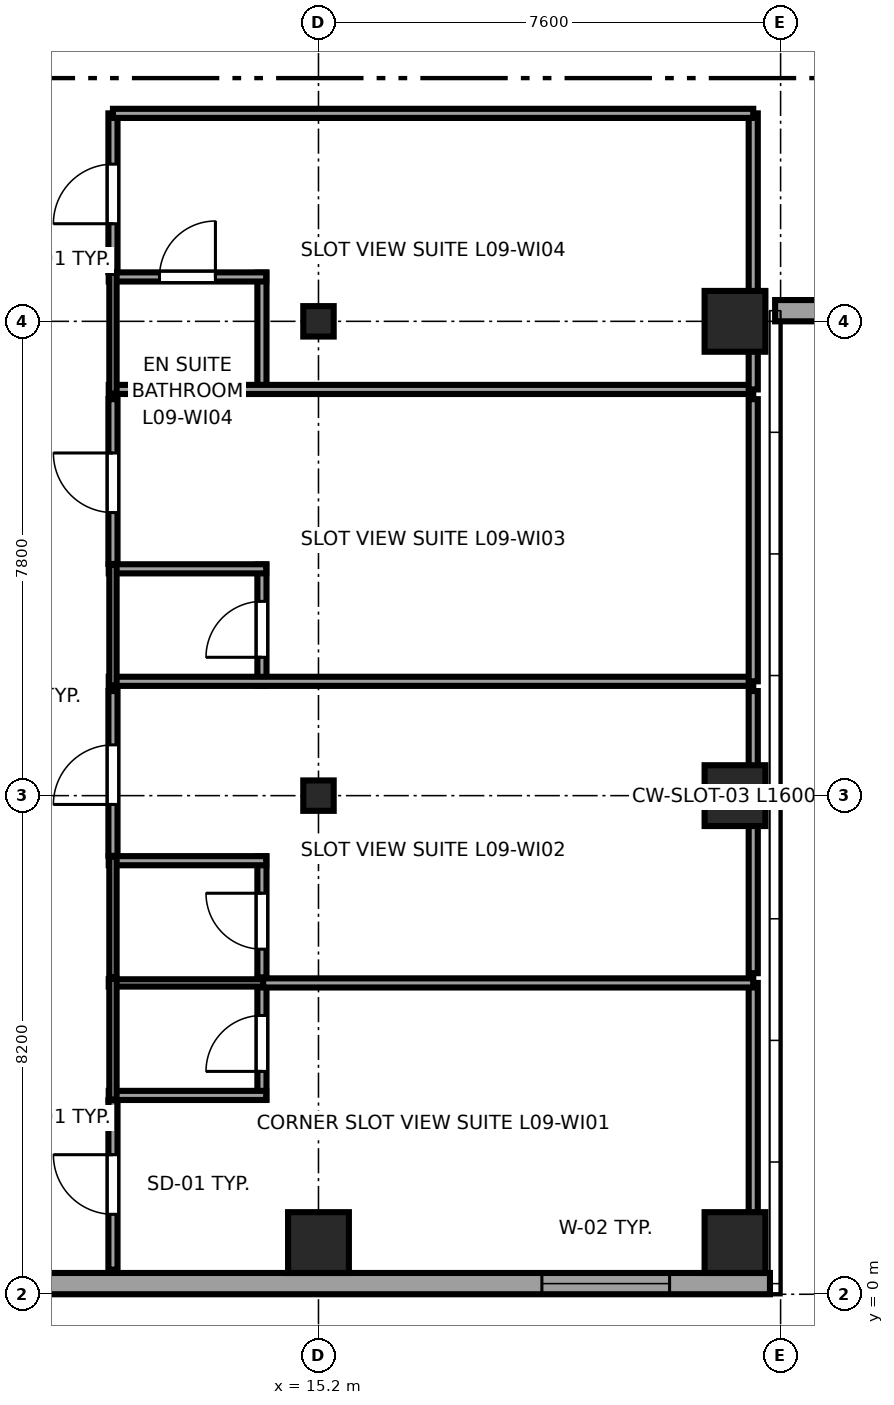
"""IFC4 building model, lengths in metres.
Left out: names, types, materials, properties, quantities, classifications, styles, units other than length and angle.
Written with IfcOpenShell. Run it as: python <this file> out.ifc"""

import sys

from ifc_helpers import new_model, si_unit, direction, frame, frame_2d, origin, origin_2d, place, context, subcontext, project, spatial, rectangle, i_section, extrude, source, transform, mapped, element, fill, save


model = new_model("IFC4")
c1 = context("Model", 3, precision=1e-05, world=origin(), true_north=direction((0.0, 1.0)))
c2 = subcontext(c1, "Body", "Model", "MODEL_VIEW")
j1 = project(units=[si_unit("LENGTHUNIT", "METRE"), si_unit("PLANEANGLEUNIT", "RADIAN")], contexts=[c1])
p1 = place(None, origin())
s1 = spatial("IfcSite", under=j1, at=p1, CompositionType="ELEMENT")
p2 = place(p1, origin())
s2 = spatial("IfcBuilding", under=s1, at=p2, CompositionType="ELEMENT")
p3 = place(p2, frame((0.0, 0.0, 42.65)))
s3 = spatial("IfcBuildingStorey", under=s2, at=p3, CompositionType="ELEMENT", Elevation=42.65)
m1 = source(origin(), c2, "Body", "SweptSolid", [
    extrude(rectangle(XDim=1.0, YDim=1.0, at=origin_2d()), origin(), (0.0, 0.0, 1.0), 3.55),
])
p4 = place(p3, frame((15.2, 0.85, 0.0), z_axis=(0.0, 0.0, 1.0), x_axis=(1.0, 0.0, 0.0)))
e1 = element("IfcColumn", 1, at=p4, inside=s3, PredefinedType="COLUMN", context=c2, shape_type="MappedRepresentation", body=[
    mapped(m1, transform((0.0, 0.0, 0.0), x_axis=(1.0, 0.0, 0.0), y_axis=(0.0, 1.0, 0.0), z_axis=(0.0, 0.0, 1.0), scale=1.0)),
])
m2 = source(origin(), c2, "Body", "SweptSolid", [
    extrude(i_section(OverallWidth=0.5, OverallDepth=0.5, WebThickness=0.028, FlangeThickness=0.045, at=origin_2d()), origin(), (0.0, 0.0, 1.0), 3.55),
])
for number, where, z_axis, x_axis in (
    (2, (15.2, 8.2, 0.0), (0.0, 0.0, 1.0), (1.0, 0.0, 0.0)),
    (3, (15.2, 16.0, 0.0), (0.0, 0.0, 1.0), (1.0, 0.0, 0.0)),
):
    element("IfcColumn", number, at=place(p3, frame(where, z_axis=z_axis, x_axis=x_axis)), inside=s3, PredefinedType="COLUMN", context=c2, shape_type="MappedRepresentation", body=[
        mapped(m2, transform((0.0, 0.0, 0.0), x_axis=(1.0, 0.0, 0.0), y_axis=(0.0, 1.0, 0.0), z_axis=(0.0, 0.0, 1.0), scale=1.0)),
    ])
for number, where, z_axis, x_axis in (
    (4, (22.05, 0.85, 0.0), (0.0, 0.0, 1.0), (1.0, 0.0, 0.0)),
    (5, (22.05, 8.2, 0.0), (0.0, 0.0, 1.0), (1.0, 0.0, 0.0)),
    (6, (22.05, 16.0, 0.0), (0.0, 0.0, 1.0), (1.0, 0.0, 0.0)),
):
    element("IfcColumn", number, at=place(p3, frame(where, z_axis=z_axis, x_axis=x_axis)), inside=s3, PredefinedType="COLUMN", context=c2, shape_type="MappedRepresentation", body=[
        mapped(m1, transform((0.0, 0.0, 0.0), x_axis=(1.0, 0.0, 0.0), y_axis=(0.0, 1.0, 0.0), z_axis=(0.0, 0.0, 1.0), scale=1.0)),
    ])
p5 = place(p3, frame((4.617, 0.175, 0.0), z_axis=(0.0, 0.0, 1.0), x_axis=(1.0, 0.0, 0.0)))
e7 = element("IfcWall", 7, at=p5, inside=s3, PredefinedType="SOLIDWALL", context=c2, shape_type="SweptSolid", body=[
    extrude(rectangle(XDim=18.008, YDim=0.35, at=frame_2d((9.004, 0.0))), origin(), (0.0, 0.0, 1.0), 3.37),
])
p6 = place(p5, frame((14.257, 0.0, 0.68)))
e8 = element("IfcOpeningElement", 8, at=p6, cuts=e7, PredefinedType="OPENING", context=c2, shape_type="SweptSolid", body=[
    extrude(rectangle(XDim=2.1, YDim=1.9, at=frame_2d((1.05, 0.95))), frame((0.0, 0.185, 0.0), z_axis=(0.0, -1.0, 0.0), x_axis=(1.0, 0.0, 0.0)), (0.0, 0.0, 1.0), 0.37),
])
p7 = place(p3, frame((22.71, 16.175, 0.0), z_axis=(0.0, 0.0, 1.0), x_axis=(1.0, 0.0, 0.0)))
e9 = element("IfcWall", 9, at=p7, inside=s3, PredefinedType="SOLIDWALL", context=c2, shape_type="SweptSolid", body=[
    extrude(rectangle(XDim=11.58, YDim=0.35, at=frame_2d((5.79, 0.0))), origin(), (0.0, 0.0, 1.0), 2.748),
])
p8 = place(p7, frame((2.145, 0.0, 0.68)))
e10 = element("IfcOpeningElement", 10, at=p8, cuts=e9, PredefinedType="OPENING", context=c2, shape_type="SweptSolid", body=[
    extrude(rectangle(XDim=2.1, YDim=1.9, at=frame_2d((1.05, 0.95))), frame((0.0, 0.185, 0.0), z_axis=(0.0, -1.0, 0.0), x_axis=(1.0, 0.0, 0.0)), (0.0, 0.0, 1.0), 0.37),
])
p9 = place(p7, frame((7.335, 0.0, 0.68)))
e11 = element("IfcOpeningElement", 11, at=p9, cuts=e9, PredefinedType="OPENING", context=c2, shape_type="SweptSolid", body=[
    extrude(rectangle(XDim=2.1, YDim=1.9, at=frame_2d((1.05, 0.95))), frame((0.0, 0.185, 0.0), z_axis=(0.0, -1.0, 0.0), x_axis=(1.0, 0.0, 0.0)), (0.0, 0.0, 1.0), 0.37),
])
p10 = place(p3, frame((14.27, 3.2, 0.0), z_axis=(0.0, 0.0, 1.0), x_axis=(0.0, 1.0, 0.0)))
e12 = element("IfcWall", 12, at=p10, inside=s3, PredefinedType="PARTITIONING", context=c2, shape_type="SweptSolid", body=[
    extrude(rectangle(XDim=1.99, YDim=0.15, at=frame_2d((0.995, 0.0))), origin(), (0.0, 0.0, 1.0), 3.37),
])
p11 = place(p10, frame((0.465, 0.0, 0.0)))
e13 = element("IfcOpeningElement", 13, at=p11, cuts=e12, PredefinedType="OPENING", context=c2, shape_type="SweptSolid", body=[
    extrude(rectangle(XDim=0.92, YDim=2.01, at=frame_2d((0.46, 1.005))), frame((0.0, 0.085, 0.0), z_axis=(0.0, -1.0, 0.0), x_axis=(1.0, 0.0, 0.0)), (0.0, 0.0, 1.0), 0.17),
])
p12 = place(p3, frame((11.75, 3.27, 0.0), z_axis=(0.0, 0.0, 1.0), x_axis=(1.0, 0.0, 0.0)))
e14 = element("IfcWall", 14, at=p12, inside=s3, PredefinedType="PARTITIONING", context=c2, shape_type="SweptSolid", body=[
    extrude(rectangle(XDim=2.59, YDim=0.15, at=frame_2d((1.295, 0.0))), origin(), (0.0, 0.0, 1.0), 3.37),
])
p13 = place(p3, frame((11.75, 5.12, 0.0), z_axis=(0.0, 0.0, 1.0), x_axis=(1.0, 0.0, 0.0)))
e15 = element("IfcWall", 15, at=p13, inside=s3, PredefinedType="PLUMBINGWALL", context=c2, shape_type="SweptSolid", body=[
    extrude(rectangle(XDim=2.59, YDim=0.12, at=frame_2d((1.295, 0.0))), origin(), (0.0, 0.0, 1.0), 3.37),
])
p14 = place(p3, frame((11.82, 3.2, 0.0), z_axis=(0.0, 0.0, 1.0), x_axis=(0.0, 1.0, 0.0)))
e16 = element("IfcWall", 16, at=p14, inside=s3, PredefinedType="PLUMBINGWALL", context=c2, shape_type="SweptSolid", body=[
    extrude(rectangle(XDim=1.99, YDim=0.12, at=frame_2d((0.995, 0.0))), origin(), (0.0, 0.0, 1.0), 3.37),
])
p15 = place(p3, frame((14.27, 5.21, 0.0), z_axis=(0.0, 0.0, 1.0), x_axis=(0.0, 1.0, 0.0)))
e17 = element("IfcWall", 17, at=p15, inside=s3, PredefinedType="PARTITIONING", context=c2, shape_type="SweptSolid", body=[
    extrude(rectangle(XDim=1.99, YDim=0.15, at=frame_2d((0.995, 0.0))), origin(), (0.0, 0.0, 1.0), 3.37),
])
p16 = place(p15, frame((0.465, 0.0, 0.0)))
e18 = element("IfcOpeningElement", 18, at=p16, cuts=e17, PredefinedType="OPENING", context=c2, shape_type="SweptSolid", body=[
    extrude(rectangle(XDim=0.92, YDim=2.01, at=frame_2d((0.46, 1.005))), frame((0.0, 0.085, 0.0), z_axis=(0.0, -1.0, 0.0), x_axis=(1.0, 0.0, 0.0)), (0.0, 0.0, 1.0), 0.17),
])
p17 = place(p3, frame((11.75, 7.13, 0.0), z_axis=(0.0, 0.0, 1.0), x_axis=(1.0, 0.0, 0.0)))
e19 = element("IfcWall", 19, at=p17, inside=s3, PredefinedType="PARTITIONING", context=c2, shape_type="SweptSolid", body=[
    extrude(rectangle(XDim=2.59, YDim=0.15, at=frame_2d((1.295, 0.0))), origin(), (0.0, 0.0, 1.0), 3.37),
])
p18 = place(p3, frame((11.82, 5.21, 0.0), z_axis=(0.0, 0.0, 1.0), x_axis=(0.0, 1.0, 0.0)))
e20 = element("IfcWall", 20, at=p18, inside=s3, PredefinedType="PLUMBINGWALL", context=c2, shape_type="SweptSolid", body=[
    extrude(rectangle(XDim=1.99, YDim=0.12, at=frame_2d((0.995, 0.0))), origin(), (0.0, 0.0, 1.0), 3.37),
])
p19 = place(p3, frame((14.27, 10.01, 0.0), z_axis=(0.0, 0.0, 1.0), x_axis=(0.0, 1.0, 0.0)))
e21 = element("IfcWall", 21, at=p19, inside=s3, PredefinedType="PARTITIONING", context=c2, shape_type="SweptSolid", body=[
    extrude(rectangle(XDim=1.99, YDim=0.15, at=frame_2d((0.995, 0.0))), origin(), (0.0, 0.0, 1.0), 3.37),
])
p20 = place(p19, frame((0.465, 0.0, 0.0)))
e22 = element("IfcOpeningElement", 22, at=p20, cuts=e21, PredefinedType="OPENING", context=c2, shape_type="SweptSolid", body=[
    extrude(rectangle(XDim=0.92, YDim=2.01, at=frame_2d((0.46, 1.005))), frame((0.0, 0.085, 0.0), z_axis=(0.0, -1.0, 0.0), x_axis=(1.0, 0.0, 0.0)), (0.0, 0.0, 1.0), 0.17),
])
p21 = place(p3, frame((11.75, 10.08, 0.0), z_axis=(0.0, 0.0, 1.0), x_axis=(1.0, 0.0, 0.0)))
e23 = element("IfcWall", 23, at=p21, inside=s3, PredefinedType="PARTITIONING", context=c2, shape_type="SweptSolid", body=[
    extrude(rectangle(XDim=10.6, YDim=0.15, at=frame_2d((5.3, 0.0))), origin(), (0.0, 0.0, 1.0), 3.37),
])
p22 = place(p3, frame((11.75, 11.93, 0.0), z_axis=(0.0, 0.0, 1.0), x_axis=(1.0, 0.0, 0.0)))
e24 = element("IfcWall", 24, at=p22, inside=s3, PredefinedType="PARTITIONING", context=c2, shape_type="SweptSolid", body=[
    extrude(rectangle(XDim=2.59, YDim=0.15, at=frame_2d((1.295, 0.0))), origin(), (0.0, 0.0, 1.0), 3.37),
])
p23 = place(p3, frame((11.82, 10.01, 0.0), z_axis=(0.0, 0.0, 1.0), x_axis=(0.0, 1.0, 0.0)))
e25 = element("IfcWall", 25, at=p23, inside=s3, PredefinedType="PLUMBINGWALL", context=c2, shape_type="SweptSolid", body=[
    extrude(rectangle(XDim=1.99, YDim=0.12, at=frame_2d((0.995, 0.0))), origin(), (0.0, 0.0, 1.0), 3.37),
])
p24 = place(p3, frame((14.27, 14.81, 0.0), z_axis=(0.0, 0.0, 1.0), x_axis=(0.0, 1.0, 0.0)))
e26 = element("IfcWall", 26, at=p24, inside=s3, PredefinedType="PARTITIONING", context=c2, shape_type="SweptSolid", body=[
    extrude(rectangle(XDim=1.99, YDim=0.15, at=frame_2d((0.995, 0.0))), origin(), (0.0, 0.0, 1.0), 3.37),
])
p25 = place(p3, frame((11.75, 14.88, 0.0), z_axis=(0.0, 0.0, 1.0), x_axis=(1.0, 0.0, 0.0)))
e27 = element("IfcWall", 27, at=p25, inside=s3, PredefinedType="PARTITIONING", context=c2, shape_type="SweptSolid", body=[
    extrude(rectangle(XDim=10.6, YDim=0.15, at=frame_2d((5.3, 0.0))), origin(), (0.0, 0.0, 1.0), 3.37),
])
p26 = place(p3, frame((11.75, 16.73, 0.0), z_axis=(0.0, 0.0, 1.0), x_axis=(1.0, 0.0, 0.0)))
e28 = element("IfcWall", 28, at=p26, inside=s3, PredefinedType="PARTITIONING", context=c2, shape_type="SweptSolid", body=[
    extrude(rectangle(XDim=2.59, YDim=0.15, at=frame_2d((1.295, 0.0))), origin(), (0.0, 0.0, 1.0), 3.37),
])
p27 = place(p26, frame((0.835, 0.0, 0.0)))
e29 = element("IfcOpeningElement", 29, at=p27, cuts=e28, PredefinedType="OPENING", context=c2, shape_type="SweptSolid", body=[
    extrude(rectangle(XDim=0.92, YDim=2.01, at=frame_2d((0.46, 1.005))), frame((0.0, 0.085, 0.0), z_axis=(0.0, -1.0, 0.0), x_axis=(1.0, 0.0, 0.0)), (0.0, 0.0, 1.0), 0.17),
])
p28 = place(p3, frame((11.82, 14.81, 0.0), z_axis=(0.0, 0.0, 1.0), x_axis=(0.0, 1.0, 0.0)))
e30 = element("IfcWall", 30, at=p28, inside=s3, PredefinedType="PLUMBINGWALL", context=c2, shape_type="SweptSolid", body=[
    extrude(rectangle(XDim=1.99, YDim=0.12, at=frame_2d((0.995, 0.0))), origin(), (0.0, 0.0, 1.0), 3.37),
])
p29 = place(p3, frame((11.82, 0.405, 0.0), z_axis=(0.0, 0.0, 1.0), x_axis=(0.0, 1.0, 0.0)))
e31 = element("IfcWall", 31, at=p29, inside=s3, PredefinedType="PARTITIONING", context=c2, shape_type="SweptSolid", body=[
    extrude(rectangle(XDim=2.785, YDim=0.15, at=frame_2d((1.393, 0.0))), origin(), (0.0, 0.0, 1.0), 3.37),
])
p30 = place(p29, frame((0.91, 0.0, 0.0)))
e32 = element("IfcOpeningElement", 32, at=p30, cuts=e31, PredefinedType="OPENING", context=c2, shape_type="SweptSolid", body=[
    extrude(rectangle(XDim=0.98, YDim=2.12, at=frame_2d((0.49, 1.06))), frame((0.0, 0.085, 0.0), z_axis=(0.0, -1.0, 0.0), x_axis=(1.0, 0.0, 0.0)), (0.0, 0.0, 1.0), 0.17),
])
p31 = place(p3, frame((22.35, 0.405, 0.0), z_axis=(0.0, 0.0, 1.0), x_axis=(0.0, 1.0, 0.0)))
e33 = element("IfcWall", 33, at=p31, inside=s3, PredefinedType="PARTITIONING", context=c2, shape_type="SweptSolid", body=[
    extrude(rectangle(XDim=4.715, YDim=0.15, at=frame_2d((2.357, 0.0))), origin(), (0.0, 0.0, 1.0), 3.37),
])
p32 = place(p3, frame((14.29, 5.12, 0.0), z_axis=(0.0, 0.0, 1.0), x_axis=(1.0, 0.0, 0.0)))
e34 = element("IfcWall", 34, at=p32, inside=s3, PredefinedType="PARTITIONING", context=c2, shape_type="SweptSolid", body=[
    extrude(rectangle(XDim=8.06, YDim=0.15, at=frame_2d((4.03, 0.0))), origin(), (0.0, 0.0, 1.0), 3.37),
])
p33 = place(p3, frame((11.82, 7.21, 0.0), z_axis=(0.0, 0.0, 1.0), x_axis=(0.0, 1.0, 0.0)))
e35 = element("IfcWall", 35, at=p33, inside=s3, PredefinedType="PARTITIONING", context=c2, shape_type="SweptSolid", body=[
    extrude(rectangle(XDim=2.71, YDim=0.15, at=frame_2d((1.355, 0.0))), origin(), (0.0, 0.0, 1.0), 3.37),
])
p34 = place(p33, frame((0.845, 0.0, 0.0)))
e36 = element("IfcOpeningElement", 36, at=p34, cuts=e35, PredefinedType="OPENING", context=c2, shape_type="SweptSolid", body=[
    extrude(rectangle(XDim=0.98, YDim=2.12, at=frame_2d((0.49, 1.06))), frame((0.0, 0.085, 0.0), z_axis=(0.0, -1.0, 0.0), x_axis=(1.0, 0.0, 0.0)), (0.0, 0.0, 1.0), 0.17),
])
p35 = place(p3, frame((22.35, 5.28, 0.0), z_axis=(0.0, 0.0, 1.0), x_axis=(0.0, 1.0, 0.0)))
e37 = element("IfcWall", 37, at=p35, inside=s3, PredefinedType="PARTITIONING", context=c2, shape_type="SweptSolid", body=[
    extrude(rectangle(XDim=4.64, YDim=0.15, at=frame_2d((2.32, 0.0))), origin(), (0.0, 0.0, 1.0), 3.37),
])
p36 = place(p3, frame((11.82, 12.01, 0.0), z_axis=(0.0, 0.0, 1.0), x_axis=(0.0, 1.0, 0.0)))
e38 = element("IfcWall", 38, at=p36, inside=s3, PredefinedType="PARTITIONING", context=c2, shape_type="SweptSolid", body=[
    extrude(rectangle(XDim=2.71, YDim=0.15, at=frame_2d((1.355, 0.0))), origin(), (0.0, 0.0, 1.0), 3.37),
])
p37 = place(p36, frame((0.845, 0.0, 0.0)))
e39 = element("IfcOpeningElement", 39, at=p37, cuts=e38, PredefinedType="OPENING", context=c2, shape_type="SweptSolid", body=[
    extrude(rectangle(XDim=0.98, YDim=2.12, at=frame_2d((0.49, 1.06))), frame((0.0, 0.085, 0.0), z_axis=(0.0, -1.0, 0.0), x_axis=(1.0, 0.0, 0.0)), (0.0, 0.0, 1.0), 0.17),
])
p38 = place(p3, frame((22.35, 10.08, 0.0), z_axis=(0.0, 0.0, 1.0), x_axis=(0.0, 1.0, 0.0)))
e40 = element("IfcWall", 40, at=p38, inside=s3, PredefinedType="PARTITIONING", context=c2, shape_type="SweptSolid", body=[
    extrude(rectangle(XDim=4.64, YDim=0.15, at=frame_2d((2.32, 0.0))), origin(), (0.0, 0.0, 1.0), 3.37),
])
p39 = place(p3, frame((11.82, 16.81, 0.0), z_axis=(0.0, 0.0, 1.0), x_axis=(0.0, 1.0, 0.0)))
e41 = element("IfcWall", 41, at=p39, inside=s3, PredefinedType="PARTITIONING", context=c2, shape_type="SweptSolid", body=[
    extrude(rectangle(XDim=2.61, YDim=0.15, at=frame_2d((1.305, 0.0))), origin(), (0.0, 0.0, 1.0), 3.37),
])
p40 = place(p39, frame((0.795, 0.0, 0.0)))
e42 = element("IfcOpeningElement", 42, at=p40, cuts=e41, PredefinedType="OPENING", context=c2, shape_type="SweptSolid", body=[
    extrude(rectangle(XDim=0.98, YDim=2.12, at=frame_2d((0.49, 1.06))), frame((0.0, 0.085, 0.0), z_axis=(0.0, -1.0, 0.0), x_axis=(1.0, 0.0, 0.0)), (0.0, 0.0, 1.0), 0.17),
])
p41 = place(p3, frame((22.35, 14.88, 0.0), z_axis=(0.0, 0.0, 1.0), x_axis=(0.0, 1.0, 0.0)))
e43 = element("IfcWall", 43, at=p41, inside=s3, PredefinedType="PARTITIONING", context=c2, shape_type="SweptSolid", body=[
    extrude(rectangle(XDim=4.54, YDim=0.15, at=frame_2d((2.27, 0.0))), origin(), (0.0, 0.0, 1.0), 3.37),
])
p42 = place(p3, frame((11.82, 19.42, 0.0), z_axis=(0.0, 0.0, 1.0), x_axis=(1.0, 0.0, 0.0)))
e44 = element("IfcWall", 44, at=p42, inside=s3, PredefinedType="PARTITIONING", context=c2, shape_type="SweptSolid", body=[
    extrude(rectangle(XDim=10.53, YDim=0.15, at=frame_2d((5.265, 0.0))), origin(), (0.0, 0.0, 1.0), 3.37),
])
m3 = source(origin(), c2, "Body", "SweptSolid", [
    extrude(rectangle(XDim=2.1, YDim=1.9, at=frame_2d((1.05, 0.95))), frame((0.0, 0.09, 0.0), z_axis=(0.0, -1.0, 0.0), x_axis=(1.0, 0.0, 0.0)), (0.0, 0.0, 1.0), 0.06),
])
p43 = place(p6, origin())
e45 = element("IfcWindow", 45, at=p43, inside=s3, PartitioningType="TRIPLE_PANEL_HORIZONTAL", PredefinedType="WINDOW", context=c2, shape_type="MappedRepresentation", body=[
    mapped(m3, transform((0.0, 0.0, 0.0), x_axis=(1.0, 0.0, 0.0), y_axis=(0.0, 1.0, 0.0), z_axis=(0.0, 0.0, 1.0), scale=1.0)),
])
fill(e8, e45)
m4 = source(origin(), c2, "Body", "SweptSolid", [
    extrude(rectangle(XDim=0.92, YDim=2.01, at=frame_2d((0.46, 1.005))), frame((0.0, 0.025, 0.0), z_axis=(0.0, -1.0, 0.0), x_axis=(1.0, 0.0, 0.0)), (0.0, 0.0, 1.0), 0.05),
])
p44 = place(p11, origin())
e46 = element("IfcDoor", 46, at=p44, inside=s3, OperationType="SINGLE_SWING_LEFT", PredefinedType="DOOR", context=c2, shape_type="MappedRepresentation", body=[
    mapped(m4, transform((0.0, 0.0, 0.0), x_axis=(1.0, 0.0, 0.0), y_axis=(0.0, 1.0, 0.0), z_axis=(0.0, 0.0, 1.0), scale=1.0)),
])
fill(e13, e46)
p45 = place(p16, origin())
e47 = element("IfcDoor", 47, at=p45, inside=s3, OperationType="SINGLE_SWING_RIGHT", PredefinedType="DOOR", context=c2, shape_type="MappedRepresentation", body=[
    mapped(m4, transform((0.0, 0.0, 0.0), x_axis=(1.0, 0.0, 0.0), y_axis=(0.0, 1.0, 0.0), z_axis=(0.0, 0.0, 1.0), scale=1.0)),
])
fill(e18, e47)
p46 = place(p20, origin())
e48 = element("IfcDoor", 48, at=p46, inside=s3, OperationType="SINGLE_SWING_LEFT", PredefinedType="DOOR", context=c2, shape_type="MappedRepresentation", body=[
    mapped(m4, transform((0.0, 0.0, 0.0), x_axis=(1.0, 0.0, 0.0), y_axis=(0.0, 1.0, 0.0), z_axis=(0.0, 0.0, 1.0), scale=1.0)),
])
fill(e22, e48)
p47 = place(p27, origin())
e49 = element("IfcDoor", 49, at=p47, inside=s3, OperationType="SINGLE_SWING_RIGHT", PredefinedType="DOOR", context=c2, shape_type="MappedRepresentation", body=[
    mapped(m4, transform((0.0, 0.0, 0.0), x_axis=(1.0, 0.0, 0.0), y_axis=(0.0, 1.0, 0.0), z_axis=(0.0, 0.0, 1.0), scale=1.0)),
])
fill(e29, e49)
m5 = source(origin(), c2, "Body", "SweptSolid", [
    extrude(rectangle(XDim=0.98, YDim=2.12, at=frame_2d((0.49, 1.06))), frame((0.0, 0.025, 0.0), z_axis=(0.0, -1.0, 0.0), x_axis=(1.0, 0.0, 0.0)), (0.0, 0.0, 1.0), 0.05),
])
p48 = place(p30, origin())
e50 = element("IfcDoor", 50, at=p48, inside=s3, OperationType="SINGLE_SWING_RIGHT", PredefinedType="DOOR", context=c2, shape_type="MappedRepresentation", body=[
    mapped(m5, transform((0.0, 0.0, 0.0), x_axis=(1.0, 0.0, 0.0), y_axis=(0.0, 1.0, 0.0), z_axis=(0.0, 0.0, 1.0), scale=1.0)),
])
fill(e32, e50)
p49 = place(p34, origin())
e51 = element("IfcDoor", 51, at=p49, inside=s3, OperationType="SINGLE_SWING_LEFT", PredefinedType="DOOR", context=c2, shape_type="MappedRepresentation", body=[
    mapped(m5, transform((0.0, 0.0, 0.0), x_axis=(1.0, 0.0, 0.0), y_axis=(0.0, 1.0, 0.0), z_axis=(0.0, 0.0, 1.0), scale=1.0)),
])
fill(e36, e51)
p50 = place(p37, origin())
e52 = element("IfcDoor", 52, at=p50, inside=s3, OperationType="SINGLE_SWING_RIGHT", PredefinedType="DOOR", context=c2, shape_type="MappedRepresentation", body=[
    mapped(m5, transform((0.0, 0.0, 0.0), x_axis=(1.0, 0.0, 0.0), y_axis=(0.0, 1.0, 0.0), z_axis=(0.0, 0.0, 1.0), scale=1.0)),
])
fill(e39, e52)
p51 = place(p40, origin())
e53 = element("IfcDoor", 53, at=p51, inside=s3, OperationType="SINGLE_SWING_LEFT", PredefinedType="DOOR", context=c2, shape_type="MappedRepresentation", body=[
    mapped(m5, transform((0.0, 0.0, 0.0), x_axis=(1.0, 0.0, 0.0), y_axis=(0.0, 1.0, 0.0), z_axis=(0.0, 0.0, 1.0), scale=1.0)),
])
fill(e42, e53)
save(model, sys.argv[1])
